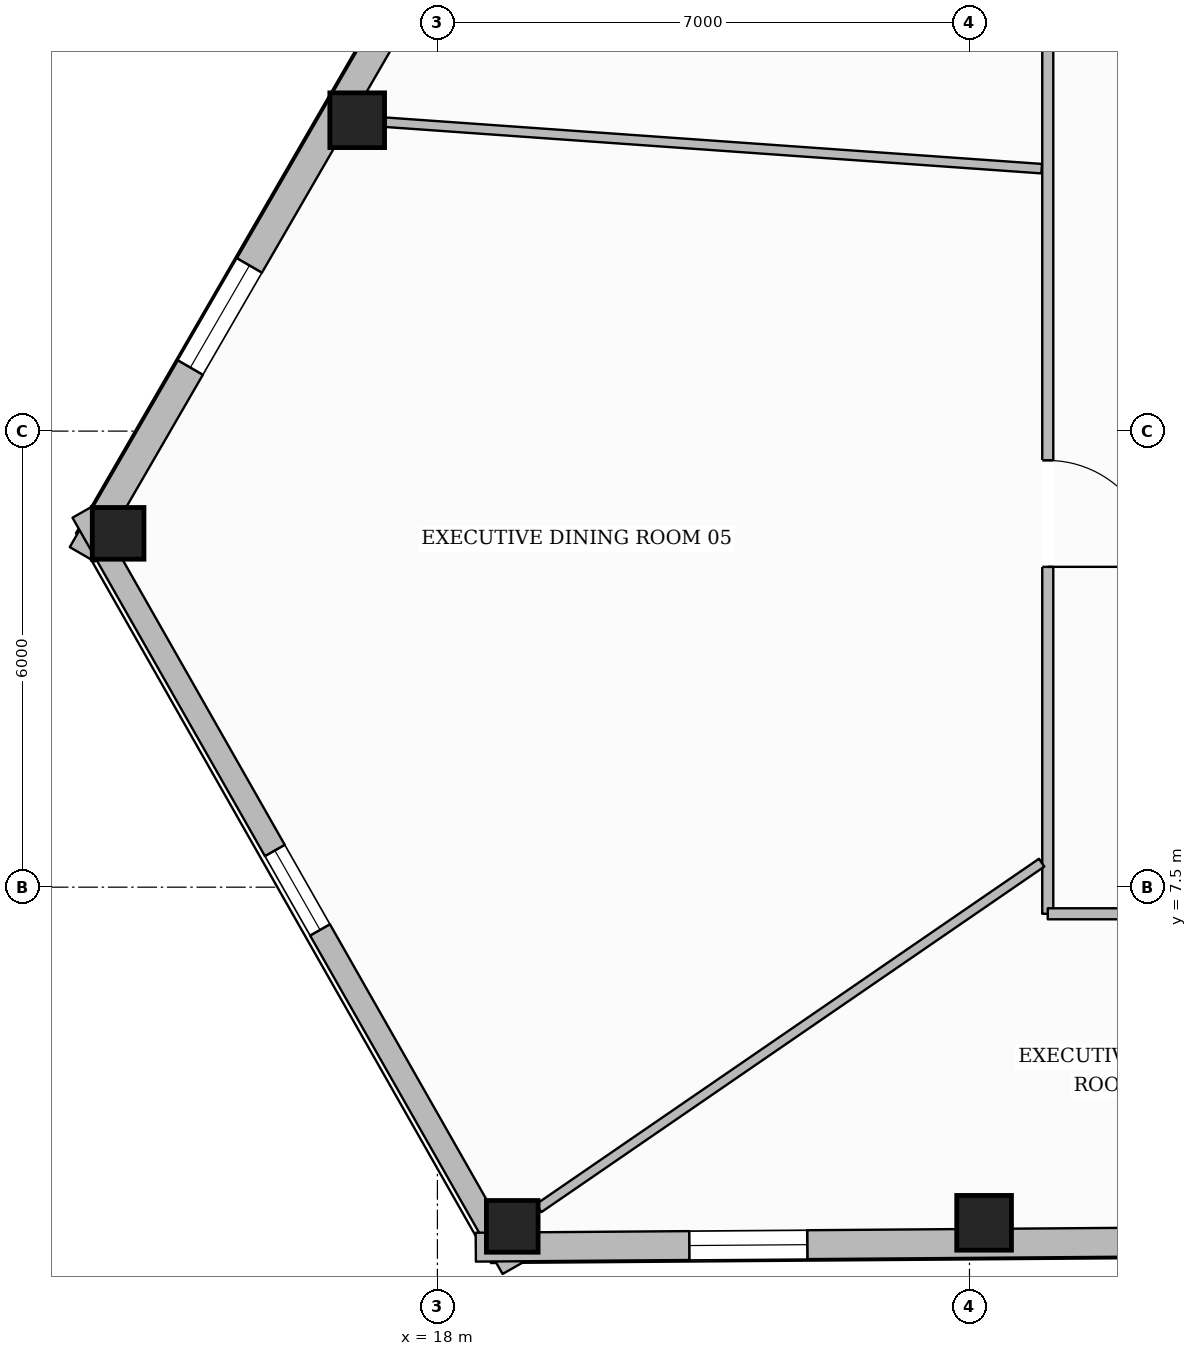
"""IFC4 building model, lengths in metres.
Left out: names, types, materials, properties, quantities, classifications, styles, units other than length and angle.
Written with IfcOpenShell. Run it as: python <this file> out.ifc"""

import sys

from ifc_helpers import new_model, si_unit, direction, frame, frame_2d, origin, origin_2d, place, context, subcontext, project, spatial, rectangle, hollow_rectangle, extrude, element, fill, save


model = new_model("IFC4")
c1 = context("Model", 3, precision=1e-05, world=origin(), true_north=direction((0.0, 1.0)))
c2 = subcontext(c1, "Body", "Model", "MODEL_VIEW")
j1 = project(units=[si_unit("LENGTHUNIT", "METRE"), si_unit("PLANEANGLEUNIT", "RADIAN")], contexts=[c1])
p1 = place(None, origin())
s1 = spatial("IfcSite", under=j1, at=p1, CompositionType="ELEMENT")
p2 = place(p1, origin())
s2 = spatial("IfcBuilding", under=s1, at=p2, CompositionType="ELEMENT")
p3 = place(p2, frame((0.0, 0.0, 150.95)))
s3 = spatial("IfcBuildingStorey", under=s2, at=p3, CompositionType="ELEMENT", Elevation=150.95)
p4 = place(p3, frame((16.945, 17.59, 0.0), z_axis=(0.0, 0.0, 1.0), x_axis=(1.0, 0.0, 0.0)))
e1 = element("IfcColumn", 1, at=p4, inside=s3, PredefinedType="COLUMN", context=c2, shape_type="SweptSolid", body=[
    extrude(hollow_rectangle(XDim=0.72, YDim=0.72, WallThickness=0.032, at=origin_2d()), origin(), (0.0, 0.0, 1.0), 3.43),
])
for number, where, z_axis, x_axis in (
    (2, (13.799, 12.155, 0.0), (0.0, 0.0, 1.0), (1.0, 0.0, 0.0)),
    (3, (18.985, 3.038, 0.0), (0.0, 0.0, 1.0), (1.0, 0.0, 0.0)),
):
    element("IfcColumn", number, at=place(p3, frame(where, z_axis=z_axis, x_axis=x_axis)), inside=s3, PredefinedType="COLUMN", context=c2, shape_type="SweptSolid", body=[
        extrude(hollow_rectangle(XDim=0.68, YDim=0.68, WallThickness=0.03, at=origin_2d()), origin(), (0.0, 0.0, 1.0), 3.43),
    ])
p5 = place(p3, frame((25.192, 3.084, 0.0), z_axis=(0.0, 0.0, 1.0), x_axis=(1.0, 0.0, 0.0)))
e4 = element("IfcColumn", 4, at=p5, inside=s3, PredefinedType="COLUMN", context=c2, shape_type="SweptSolid", body=[
    extrude(hollow_rectangle(XDim=0.72, YDim=0.72, WallThickness=0.032, at=origin_2d()), origin(), (0.0, 0.0, 1.0), 3.43),
])
p6 = place(p3, frame((13.327, 11.879, 0.0), z_axis=(0.0, 0.0, 1.0), x_axis=(0.500913687278, 0.865497243148, 0.0)))
e5 = element("IfcWall", 5, at=p6, inside=s3, PredefinedType="STANDARD", context=c2, shape_type="SweptSolid", body=[
    extrude(rectangle(XDim=38.628, YDim=0.38, at=frame_2d((19.314, 0.0))), origin(), (0.0, 0.0, 1.0), 2.889),
])
p7 = place(p6, frame((9.257, 0.0, 0.0)))
e6 = element("IfcOpeningElement", 6, at=p7, cuts=e5, PredefinedType="OPENING", context=c2, shape_type="SweptSolid", body=[
    extrude(rectangle(XDim=1.0, YDim=2.2, at=frame_2d((0.5, 1.1))), frame((0.0, 0.2, 0.0), z_axis=(0.0, -1.0, 0.0), x_axis=(1.0, 0.0, 0.0)), (0.0, 0.0, 1.0), 0.4),
])
p8 = place(p6, frame((34.239, 0.0, 0.55)))
e7 = element("IfcOpeningElement", 7, at=p8, cuts=e5, PredefinedType="OPENING", context=c2, shape_type="SweptSolid", body=[
    extrude(rectangle(XDim=1.55, YDim=1.6, at=frame_2d((0.775, 0.8))), frame((0.0, 0.2, 0.0), z_axis=(0.0, -1.0, 0.0), x_axis=(1.0, 0.0, 0.0)), (0.0, 0.0, 1.0), 0.4),
])
p9 = place(p6, frame((27.959, 0.0, 0.55)))
e8 = element("IfcOpeningElement", 8, at=p9, cuts=e5, PredefinedType="OPENING", context=c2, shape_type="SweptSolid", body=[
    extrude(rectangle(XDim=1.55, YDim=1.6, at=frame_2d((0.775, 0.8))), frame((0.0, 0.2, 0.0), z_axis=(0.0, -1.0, 0.0), x_axis=(1.0, 0.0, 0.0)), (0.0, 0.0, 1.0), 0.4),
])
p10 = place(p6, frame((21.679, 0.0, 0.55)))
e9 = element("IfcOpeningElement", 9, at=p10, cuts=e5, PredefinedType="OPENING", context=c2, shape_type="SweptSolid", body=[
    extrude(rectangle(XDim=1.55, YDim=1.6, at=frame_2d((0.775, 0.8))), frame((0.0, 0.2, 0.0), z_axis=(0.0, -1.0, 0.0), x_axis=(1.0, 0.0, 0.0)), (0.0, 0.0, 1.0), 0.4),
])
p11 = place(p6, frame((2.84, 0.0, 0.55)))
e10 = element("IfcOpeningElement", 10, at=p11, cuts=e5, PredefinedType="OPENING", context=c2, shape_type="SweptSolid", body=[
    extrude(rectangle(XDim=1.55, YDim=1.6, at=frame_2d((0.775, 0.8))), frame((0.0, 0.2, 0.0), z_axis=(0.0, -1.0, 0.0), x_axis=(1.0, 0.0, 0.0)), (0.0, 0.0, 1.0), 0.4),
])
p12 = place(p3, frame((18.988, 2.486, 0.0), z_axis=(0.0, 0.0, 1.0), x_axis=(-0.494355320485, 0.869259924941, 0.0)))
e11 = element("IfcWall", 11, at=p12, inside=s3, PredefinedType="STANDARD", context=c2, shape_type="SweptSolid", body=[
    extrude(rectangle(XDim=11.446, YDim=0.3, at=frame_2d((5.723, 0.0))), origin(), (0.0, 0.0, 1.0), 2.889),
])
p13 = place(p12, frame((5.123, 0.0, 0.65)))
e12 = element("IfcOpeningElement", 12, at=p13, cuts=e11, PredefinedType="OPENING", context=c2, shape_type="SweptSolid", body=[
    extrude(rectangle(XDim=1.2, YDim=1.55, at=frame_2d((0.6, 0.775))), frame((0.0, 0.16, 0.0), z_axis=(0.0, -1.0, 0.0), x_axis=(1.0, 0.0, 0.0)), (0.0, 0.0, 1.0), 0.32),
])
p14 = place(p3, frame((56.708, 3.052, 0.0), z_axis=(0.0, 0.0, 1.0), x_axis=(-0.999971472173, -0.007553465491, 0.0)))
e13 = element("IfcWall", 13, at=p14, inside=s3, PredefinedType="STANDARD", context=c2, shape_type="SweptSolid", body=[
    extrude(rectangle(XDim=38.204, YDim=0.38, at=frame_2d((19.102, 0.0))), origin(), (0.0, 0.0, 1.0), 2.889),
])
p15 = place(p14, frame((33.844, 0.0, 0.55)))
e14 = element("IfcOpeningElement", 14, at=p15, cuts=e13, PredefinedType="OPENING", context=c2, shape_type="SweptSolid", body=[
    extrude(rectangle(XDim=1.55, YDim=1.6, at=frame_2d((0.775, 0.8))), frame((0.0, 0.2, 0.0), z_axis=(0.0, -1.0, 0.0), x_axis=(1.0, 0.0, 0.0)), (0.0, 0.0, 1.0), 0.4),
])
p16 = place(p14, frame((27.635, 0.0, 0.55)))
e15 = element("IfcOpeningElement", 15, at=p16, cuts=e13, PredefinedType="OPENING", context=c2, shape_type="SweptSolid", body=[
    extrude(rectangle(XDim=1.55, YDim=1.6, at=frame_2d((0.775, 0.8))), frame((0.0, 0.2, 0.0), z_axis=(0.0, -1.0, 0.0), x_axis=(1.0, 0.0, 0.0)), (0.0, 0.0, 1.0), 0.4),
])
p17 = place(p14, frame((21.427, 0.0, 0.55)))
e16 = element("IfcOpeningElement", 16, at=p17, cuts=e13, PredefinedType="OPENING", context=c2, shape_type="SweptSolid", body=[
    extrude(rectangle(XDim=1.55, YDim=1.6, at=frame_2d((0.775, 0.8))), frame((0.0, 0.2, 0.0), z_axis=(0.0, -1.0, 0.0), x_axis=(1.0, 0.0, 0.0)), (0.0, 0.0, 1.0), 0.4),
])
p18 = place(p14, frame((9.011, 0.0, 0.55)))
e17 = element("IfcOpeningElement", 17, at=p18, cuts=e13, PredefinedType="OPENING", context=c2, shape_type="SweptSolid", body=[
    extrude(rectangle(XDim=1.55, YDim=1.6, at=frame_2d((0.775, 0.8))), frame((0.0, 0.2, 0.0), z_axis=(0.0, -1.0, 0.0), x_axis=(1.0, 0.0, 0.0)), (0.0, 0.0, 1.0), 0.4),
])
p19 = place(p14, frame((2.803, 0.0, 0.55)))
e18 = element("IfcOpeningElement", 18, at=p19, cuts=e13, PredefinedType="OPENING", context=c2, shape_type="SweptSolid", body=[
    extrude(rectangle(XDim=1.55, YDim=1.6, at=frame_2d((0.775, 0.8))), frame((0.0, 0.2, 0.0), z_axis=(0.0, -1.0, 0.0), x_axis=(1.0, 0.0, 0.0)), (0.0, 0.0, 1.0), 0.4),
])
p20 = place(p3, frame((26.03, 25.05, 0.0), z_axis=(0.0, 0.0, 1.0), x_axis=(0.0, -1.0, 0.0)))
e19 = element("IfcWall", 19, at=p20, inside=s3, PredefinedType="PARTITIONING", context=c2, shape_type="SweptSolid", body=[
    extrude(rectangle(XDim=17.9, YDim=0.145, at=frame_2d((8.95, 0.0))), origin(), (0.0, 0.0, 1.0), 3.118),
])
p21 = place(p20, frame((3.644, 0.0, 0.0)))
e20 = element("IfcOpeningElement", 20, at=p21, cuts=e19, PredefinedType="OPENING", context=c2, shape_type="SweptSolid", body=[
    extrude(rectangle(XDim=0.98, YDim=2.15, at=frame_2d((0.49, 1.075))), frame((0.0, 0.083, 0.0), z_axis=(0.0, -1.0, 0.0), x_axis=(1.0, 0.0, 0.0)), (0.0, 0.0, 1.0), 0.165),
])
p22 = place(p20, frame((11.936, 0.0, 0.0)))
e21 = element("IfcOpeningElement", 21, at=p22, cuts=e19, PredefinedType="OPENING", context=c2, shape_type="SweptSolid", body=[
    extrude(rectangle(XDim=1.4, YDim=2.2, at=frame_2d((0.7, 1.1))), frame((0.0, 0.083, 0.0), z_axis=(0.0, -1.0, 0.0), x_axis=(1.0, 0.0, 0.0)), (0.0, 0.0, 1.0), 0.165),
])
p23 = place(p3, frame((26.03, 7.15, 0.0), z_axis=(0.0, 0.0, 1.0), x_axis=(1.0, 0.0, 0.0)))
e22 = element("IfcWall", 22, at=p23, inside=s3, PredefinedType="PARTITIONING", context=c2, shape_type="SweptSolid", body=[
    extrude(rectangle(XDim=23.94, YDim=0.145, at=frame_2d((11.97, 0.0))), origin(), (0.0, 0.0, 1.0), 3.43),
])
p24 = place(p23, frame((4.53, 0.0, 0.0)))
e23 = element("IfcOpeningElement", 23, at=p24, cuts=e22, PredefinedType="OPENING", context=c2, shape_type="SweptSolid", body=[
    extrude(rectangle(XDim=0.88, YDim=2.1, at=frame_2d((0.44, 1.05))), frame((0.0, 0.083, 0.0), z_axis=(0.0, -1.0, 0.0), x_axis=(1.0, 0.0, 0.0)), (0.0, 0.0, 1.0), 0.165),
])
p25 = place(p23, frame((7.05, 0.0, 0.0)))
e24 = element("IfcOpeningElement", 24, at=p25, cuts=e22, PredefinedType="OPENING", context=c2, shape_type="SweptSolid", body=[
    extrude(rectangle(XDim=0.88, YDim=2.1, at=frame_2d((0.44, 1.05))), frame((0.0, 0.083, 0.0), z_axis=(0.0, -1.0, 0.0), x_axis=(1.0, 0.0, 0.0)), (0.0, 0.0, 1.0), 0.165),
])
p26 = place(p23, frame((9.43, 0.0, 0.0)))
e25 = element("IfcOpeningElement", 25, at=p26, cuts=e22, PredefinedType="OPENING", context=c2, shape_type="SweptSolid", body=[
    extrude(rectangle(XDim=0.96, YDim=2.1, at=frame_2d((0.48, 1.05))), frame((0.0, 0.083, 0.0), z_axis=(0.0, -1.0, 0.0), x_axis=(1.0, 0.0, 0.0)), (0.0, 0.0, 1.0), 0.165),
])
p27 = place(p23, frame((13.062, 0.0, 0.0)))
e26 = element("IfcOpeningElement", 26, at=p27, cuts=e22, PredefinedType="OPENING", context=c2, shape_type="SweptSolid", body=[
    extrude(rectangle(XDim=0.98, YDim=2.15, at=frame_2d((0.49, 1.075))), frame((0.0, 0.083, 0.0), z_axis=(0.0, -1.0, 0.0), x_axis=(1.0, 0.0, 0.0)), (0.0, 0.0, 1.0), 0.165),
])
p28 = place(p23, frame((19.41, 0.0, 0.0)))
e27 = element("IfcOpeningElement", 27, at=p28, cuts=e22, PredefinedType="OPENING", context=c2, shape_type="SweptSolid", body=[
    extrude(rectangle(XDim=1.4, YDim=2.2, at=frame_2d((0.7, 1.1))), frame((0.0, 0.083, 0.0), z_axis=(0.0, -1.0, 0.0), x_axis=(1.0, 0.0, 0.0)), (0.0, 0.0, 1.0), 0.165),
])
p29 = place(p3, frame((25.949, 16.953, 0.0), z_axis=(0.0, 0.0, 1.0), x_axis=(-0.997506141345, 0.070579727824, 0.0)))
e28 = element("IfcWall", 28, at=p29, inside=s3, PredefinedType="PARTITIONING", context=c2, shape_type="SweptSolid", body=[
    extrude(rectangle(XDim=8.658, YDim=0.125, at=frame_2d((4.329, 0.0))), origin(), (0.0, 0.0, 1.0), 2.971),
])
p30 = place(p3, frame((25.949, 7.822, 0.0), z_axis=(0.0, 0.0, 1.0), x_axis=(-0.824259265704, -0.566212559823, 0.0)))
e29 = element("IfcWall", 29, at=p30, inside=s3, PredefinedType="PARTITIONING", context=c2, shape_type="SweptSolid", body=[
    extrude(rectangle(XDim=8.028, YDim=0.125, at=frame_2d((4.014, 0.0))), origin(), (0.0, 0.0, 1.0), 2.971),
])
p31 = place(p11, origin())
e30 = element("IfcWindow", 30, at=p31, inside=s3, PartitioningType="SINGLE_PANEL", PredefinedType="WINDOW", context=c2, shape_type="SweptSolid", body=[
    extrude(rectangle(XDim=1.55, YDim=1.6, at=frame_2d((0.775, 0.8))), frame((0.0, 0.03, 0.0), z_axis=(0.0, -1.0, 0.0), x_axis=(1.0, 0.0, 0.0)), (0.0, 0.0, 1.0), 0.06),
])
fill(e10, e30)
p32 = place(p15, origin())
e31 = element("IfcWindow", 31, at=p32, inside=s3, PartitioningType="SINGLE_PANEL", PredefinedType="WINDOW", context=c2, shape_type="SweptSolid", body=[
    extrude(rectangle(XDim=1.55, YDim=1.6, at=frame_2d((0.775, 0.8))), frame((0.0, 0.03, 0.0), z_axis=(0.0, -1.0, 0.0), x_axis=(1.0, 0.0, 0.0)), (0.0, 0.0, 1.0), 0.06),
])
fill(e14, e31)
p33 = place(p13, origin())
e32 = element("IfcWindow", 32, at=p33, inside=s3, PartitioningType="SINGLE_PANEL", PredefinedType="WINDOW", context=c2, shape_type="SweptSolid", body=[
    extrude(rectangle(XDim=1.2, YDim=1.55, at=frame_2d((0.6, 0.775))), frame((0.0, 0.03, 0.0), z_axis=(0.0, -1.0, 0.0), x_axis=(1.0, 0.0, 0.0)), (0.0, 0.0, 1.0), 0.06),
])
fill(e12, e32)
p34 = place(p22, origin())
e33 = element("IfcDoor", 33, at=p34, inside=s3, OperationType="SINGLE_SWING_RIGHT", PredefinedType="DOOR", context=c2, shape_type="SweptSolid", body=[
    extrude(rectangle(XDim=1.4, YDim=2.2, at=frame_2d((0.7, 1.1))), frame((0.0, 0.025, 0.0), z_axis=(0.0, -1.0, 0.0), x_axis=(1.0, 0.0, 0.0)), (0.0, 0.0, 1.0), 0.05),
])
fill(e21, e33)
save(model, sys.argv[1])
